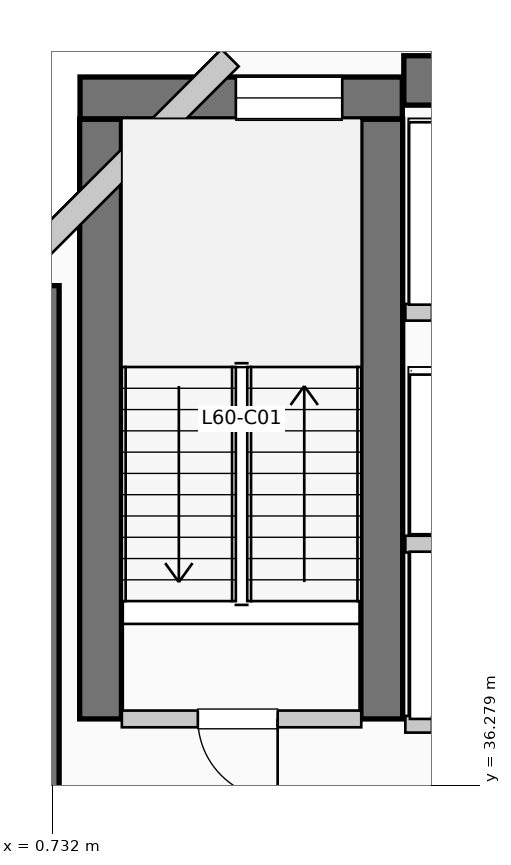
"""IFC4 building model, lengths in metres.
Left out: names, types, materials, properties, quantities, classifications, styles, units other than length and angle.
Written with IfcOpenShell. Run it as: python <this file> out.ifc"""

import sys

from ifc_helpers import new_model, si_unit, direction, frame, frame_2d, origin, place, context, subcontext, project, spatial, rectangle, extrude, element, fill, save


model = new_model("IFC4")
c1 = context("Model", 3, precision=1e-05, world=origin(), true_north=direction((0.0, 1.0)))
c2 = subcontext(c1, "Body", "Model", "MODEL_VIEW")
j1 = project(units=[si_unit("LENGTHUNIT", "METRE"), si_unit("PLANEANGLEUNIT", "RADIAN")], contexts=[c1])
p1 = place(None, origin())
s1 = spatial("IfcSite", under=j1, at=p1, CompositionType="ELEMENT")
p2 = place(p1, origin())
s2 = spatial("IfcBuilding", under=s1, at=p2, CompositionType="ELEMENT")
p3 = place(p2, frame((0.0, 0.0, 247.5)))
s3 = spatial("IfcBuildingStorey", under=s2, at=p3, CompositionType="ELEMENT", Elevation=247.5)
p4 = place(p3, frame((5.36, 45.55, 0.0), z_axis=(0.0, 0.0, 1.0), x_axis=(1.0, 0.0, 0.0)))
e1 = element("IfcWall", 1, at=p4, inside=s3, PredefinedType="SHEAR", context=c2, shape_type="SweptSolid", body=[
    extrude(rectangle(XDim=13.98, YDim=0.65, at=frame_2d((6.99, 0.0))), origin(), (0.0, 0.0, 1.0), 3.96),
])
p5 = place(p3, frame((0.5, 34.95, 0.0), z_axis=(0.0, 0.0, 1.0), x_axis=(0.0, 1.0, 0.0)))
e2 = element("IfcWall", 2, at=p5, inside=s3, PredefinedType="SHEAR", context=c2, shape_type="SweptSolid", body=[
    extrude(rectangle(XDim=7.9, YDim=0.65, at=frame_2d((3.95, 0.0))), origin(), (0.0, 0.0, 1.0), 3.96),
])
for number, where, z_axis, x_axis in (
    (3, (1.37, 37.15, 0.0), (0.0, 0.0, 1.0), (0.0, 1.0, 0.0)),
    (4, (5.07, 37.15, 0.0), (0.0, 0.0, 1.0), (0.0, 1.0, 0.0)),
):
    element("IfcWall", number, at=place(p3, frame(where, z_axis=z_axis, x_axis=x_axis)), inside=s3, PredefinedType="SHEAR", context=c2, shape_type="SweptSolid", body=[
        extrude(rectangle(XDim=7.89, YDim=0.55, at=frame_2d((3.945, 0.0))), origin(), (0.0, 0.0, 1.0), 3.96),
    ])
p6 = place(p3, frame((1.1, 45.32, 0.0), z_axis=(0.0, 0.0, 1.0), x_axis=(1.0, 0.0, 0.0)))
e5 = element("IfcWall", 5, at=p6, inside=s3, PredefinedType="SHEAR", context=c2, shape_type="SweptSolid", body=[
    extrude(rectangle(XDim=4.24, YDim=0.55, at=frame_2d((2.12, 0.0))), origin(), (0.0, 0.0, 1.0), 3.96),
])
p7 = place(p6, frame((2.05, 0.0, 1.05)))
e6 = element("IfcOpeningElement", 6, at=p7, cuts=e5, PredefinedType="OPENING", context=c2, shape_type="SweptSolid", body=[
    extrude(rectangle(XDim=1.4, YDim=1.8, at=frame_2d((0.7, 0.9))), frame((0.0, 0.285, 0.0), z_axis=(0.0, -1.0, 0.0), x_axis=(1.0, 0.0, 0.0)), (0.0, 0.0, 1.0), 0.57),
])
p8 = place(p3, frame((3.074, 45.848, 0.0), z_axis=(0.0, 0.0, 1.0), x_axis=(-0.707106781187, -0.707106781187, 0.0)))
e7 = element("IfcWall", 7, at=p8, inside=s3, PredefinedType="SOLIDWALL", context=c2, shape_type="SweptSolid", body=[
    extrude(rectangle(XDim=4.133, YDim=0.32, at=frame_2d((2.066, 0.0))), origin(), (0.0, 0.0, 1.0), 3.54),
])
p9 = place(p3, frame((1.65, 37.15, 0.0), z_axis=(0.0, 0.0, 1.0), x_axis=(1.0, 0.0, 0.0)))
e8 = element("IfcWall", 8, at=p9, inside=s3, PredefinedType="PARTITIONING", context=c2, shape_type="SweptSolid", body=[
    extrude(rectangle(XDim=3.15, YDim=0.22, at=frame_2d((1.575, 0.0))), origin(), (0.0, 0.0, 1.0), 3.54),
])
p10 = place(p9, frame((2.05, 0.0, 0.0), z_axis=(0.0, 0.0, 1.0), x_axis=(-1.0, 0.0, 0.0)))
e9 = element("IfcOpeningElement", 9, at=p10, cuts=e8, PredefinedType="OPENING", context=c2, shape_type="SweptSolid", body=[
    extrude(rectangle(XDim=1.05, YDim=2.15, at=frame_2d((0.525, 1.075))), frame((0.0, 0.12, 0.0), z_axis=(0.0, -1.0, 0.0), x_axis=(1.0, 0.0, 0.0)), (0.0, 0.0, 1.0), 0.24),
])
p11 = place(p3, frame((5.38, 37.08, 0.0), z_axis=(0.0, 0.0, 1.0), x_axis=(1.0, 0.0, 0.0)))
e10 = element("IfcWall", 10, at=p11, inside=s3, PredefinedType="PARTITIONING", context=c2, shape_type="SweptSolid", body=[
    extrude(rectangle(XDim=3.46, YDim=0.22, at=frame_2d((1.73, 0.0))), origin(), (0.0, 0.0, 1.0), 3.54),
])
p12 = place(p11, frame((1.55, 0.0, 0.0), z_axis=(0.0, 0.0, 1.0), x_axis=(-1.0, 0.0, 0.0)))
e11 = element("IfcOpeningElement", 11, at=p12, cuts=e10, PredefinedType="OPENING", context=c2, shape_type="SweptSolid", body=[
    extrude(rectangle(XDim=1.2, YDim=2.2, at=frame_2d((0.6, 1.1))), frame((0.0, 0.12, 0.0), z_axis=(0.0, -1.0, 0.0), x_axis=(1.0, 0.0, 0.0)), (0.0, 0.0, 1.0), 0.24),
])
p13 = place(p11, frame((3.22, 0.0, 0.0), z_axis=(0.0, 0.0, 1.0), x_axis=(-1.0, 0.0, 0.0)))
e12 = element("IfcOpeningElement", 12, at=p13, cuts=e10, PredefinedType="OPENING", context=c2, shape_type="SweptSolid", body=[
    extrude(rectangle(XDim=1.2, YDim=2.2, at=frame_2d((0.6, 1.1))), frame((0.0, 0.12, 0.0), z_axis=(0.0, -1.0, 0.0), x_axis=(1.0, 0.0, 0.0)), (0.0, 0.0, 1.0), 0.24),
])
p14 = place(p3, frame((5.38, 39.45, 0.0), z_axis=(0.0, 0.0, 1.0), x_axis=(1.0, 0.0, 0.0)))
e13 = element("IfcWall", 13, at=p14, inside=s3, PredefinedType="PARTITIONING", context=c2, shape_type="SweptSolid", body=[
    extrude(rectangle(XDim=3.46, YDim=0.22, at=frame_2d((1.73, 0.0))), origin(), (0.0, 0.0, 1.0), 3.54),
])
p15 = place(p3, frame((5.38, 42.5, 0.0), z_axis=(0.0, 0.0, 1.0), x_axis=(1.0, 0.0, 0.0)))
e14 = element("IfcWall", 14, at=p15, inside=s3, PredefinedType="PARTITIONING", context=c2, shape_type="SweptSolid", body=[
    extrude(rectangle(XDim=3.77, YDim=0.22, at=frame_2d((1.885, 0.0))), origin(), (0.0, 0.0, 1.0), 3.54),
])
p16 = place(p15, frame((1.75, 0.0, 0.0), z_axis=(0.0, 0.0, 1.0), x_axis=(-1.0, 0.0, 0.0)))
e15 = element("IfcOpeningElement", 15, at=p16, cuts=e14, PredefinedType="OPENING", context=c2, shape_type="SweptSolid", body=[
    extrude(rectangle(XDim=1.4, YDim=2.2, at=frame_2d((0.7, 1.1))), frame((0.0, 0.12, 0.0), z_axis=(0.0, -1.0, 0.0), x_axis=(1.0, 0.0, 0.0)), (0.0, 0.0, 1.0), 0.24),
])
p17 = place(p15, frame((3.53, 0.0, 0.0), z_axis=(0.0, 0.0, 1.0), x_axis=(-1.0, 0.0, 0.0)))
e16 = element("IfcOpeningElement", 16, at=p17, cuts=e14, PredefinedType="OPENING", context=c2, shape_type="SweptSolid", body=[
    extrude(rectangle(XDim=1.4, YDim=2.2, at=frame_2d((0.7, 1.1))), frame((0.0, 0.12, 0.0), z_axis=(0.0, -1.0, 0.0), x_axis=(1.0, 0.0, 0.0)), (0.0, 0.0, 1.0), 0.24),
])
p18 = place(p7, origin())
e17 = element("IfcWindow", 17, at=p18, inside=s3, PartitioningType="SINGLE_PANEL", PredefinedType="WINDOW", context=c2, shape_type="SweptSolid", body=[
    extrude(rectangle(XDim=1.4, YDim=1.8, at=frame_2d((0.7, 0.9))), frame((0.0, 0.03, 0.0), z_axis=(0.0, -1.0, 0.0), x_axis=(1.0, 0.0, 0.0)), (0.0, 0.0, 1.0), 0.06),
])
fill(e6, e17)
p19 = place(p10, origin())
e18 = element("IfcDoor", 18, at=p19, inside=s3, OperationType="SINGLE_SWING_RIGHT", PredefinedType="DOOR", context=c2, shape_type="SweptSolid", body=[
    extrude(rectangle(XDim=1.05, YDim=2.15, at=frame_2d((0.525, 1.075))), frame((0.0, 0.025, 0.0), z_axis=(0.0, -1.0, 0.0), x_axis=(1.0, 0.0, 0.0)), (0.0, 0.0, 1.0), 0.05),
])
fill(e9, e18)
save(model, sys.argv[1])
